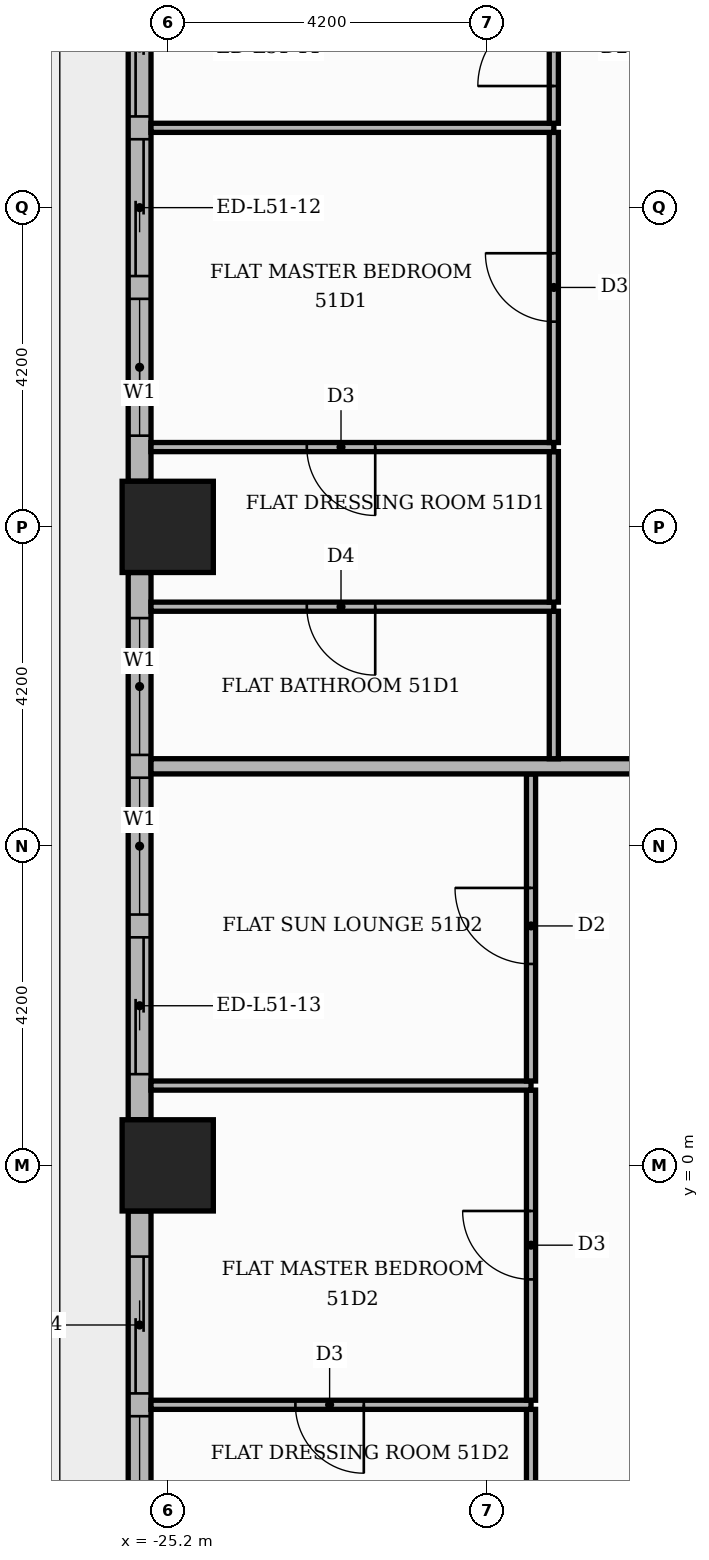
"""IFC4 building model, lengths in metres.
Left out: names, types, materials, properties, quantities, classifications, styles, units other than length and angle.
Written with IfcOpenShell. Run it as: python <this file> out.ifc"""

import sys

from ifc_helpers import new_model, si_unit, direction, frame, frame_2d, origin, origin_2d, place, context, subcontext, project, spatial, rectangle, extrude, element, fill, save


model = new_model("IFC4")
c1 = context("Model", 3, precision=1e-05, world=origin(), true_north=direction((0.0, 1.0)))
c2 = subcontext(c1, "Body", "Model", "MODEL_VIEW")
j1 = project(units=[si_unit("LENGTHUNIT", "METRE"), si_unit("PLANEANGLEUNIT", "RADIAN")], contexts=[c1])
p1 = place(None, origin())
s1 = spatial("IfcSite", under=j1, at=p1, CompositionType="ELEMENT")
p2 = place(p1, origin())
s2 = spatial("IfcBuilding", under=s1, at=p2, CompositionType="ELEMENT")
p3 = place(p2, frame((0.0, 0.0, 215.7)))
s3 = spatial("IfcBuildingStorey", under=s2, at=p3, CompositionType="ELEMENT", Elevation=215.7)
for number, where, z_axis, x_axis in (
    (1, (-25.2, 0.0, 0.0), (0.0, 0.0, 1.0), (1.0, 0.0, 0.0)),
    (2, (-25.2, 8.4, 0.0), (0.0, 0.0, 1.0), (1.0, 0.0, 0.0)),
):
    element("IfcColumn", number, at=place(p3, frame(where, z_axis=z_axis, x_axis=x_axis)), inside=s3, PredefinedType="COLUMN", context=c2, shape_type="SweptSolid", body=[
        extrude(rectangle(XDim=1.2, YDim=1.2, at=origin_2d()), origin(), (0.0, 0.0, 1.0), 3.9),
    ])
p4 = place(p3, frame((-25.57, 16.2, 0.0), z_axis=(0.0, 0.0, 1.0), x_axis=(0.0, -1.0, 0.0)))
e3 = element("IfcWall", 3, at=p4, inside=s3, PredefinedType="STANDARD", context=c2, shape_type="SweptSolid", body=[
    extrude(rectangle(XDim=7.2, YDim=0.3, at=frame_2d((3.6, 0.0))), origin(), (0.0, 0.0, 1.0), 3.48),
])
p5 = place(p4, frame((0.6, 0.0, 0.0)))
e4 = element("IfcOpeningElement", 4, at=p5, cuts=e3, PredefinedType="OPENING", context=c2, shape_type="SweptSolid", body=[
    extrude(rectangle(XDim=1.8, YDim=2.4, at=frame_2d((0.9, 1.2))), frame((0.0, 0.16, 0.0), z_axis=(0.0, -1.0, 0.0), x_axis=(1.0, 0.0, 0.0)), (0.0, 0.0, 1.0), 0.32),
])
p6 = place(p4, frame((2.7, 0.0, 0.0)))
e5 = element("IfcOpeningElement", 5, at=p6, cuts=e3, PredefinedType="OPENING", context=c2, shape_type="SweptSolid", body=[
    extrude(rectangle(XDim=1.8, YDim=2.4, at=frame_2d((0.9, 1.2))), frame((0.0, 0.16, 0.0), z_axis=(0.0, -1.0, 0.0), x_axis=(1.0, 0.0, 0.0)), (0.0, 0.0, 1.0), 0.32),
])
p7 = place(p4, frame((4.8, 0.0, 0.9)))
e6 = element("IfcOpeningElement", 6, at=p7, cuts=e3, PredefinedType="OPENING", context=c2, shape_type="SweptSolid", body=[
    extrude(rectangle(XDim=1.8, YDim=2.1, at=frame_2d((0.9, 1.05))), frame((0.0, 0.16, 0.0), z_axis=(0.0, -1.0, 0.0), x_axis=(1.0, 0.0, 0.0)), (0.0, 0.0, 1.0), 0.32),
])
p8 = place(p3, frame((-25.57, 7.8, 0.0), z_axis=(0.0, 0.0, 1.0), x_axis=(0.0, -1.0, 0.0)))
e7 = element("IfcWall", 7, at=p8, inside=s3, PredefinedType="STANDARD", context=c2, shape_type="SweptSolid", body=[
    extrude(rectangle(XDim=7.2, YDim=0.3, at=frame_2d((3.6, 0.0))), origin(), (0.0, 0.0, 1.0), 3.48),
])
p9 = place(p8, frame((0.6, 0.0, 0.9)))
e8 = element("IfcOpeningElement", 8, at=p9, cuts=e7, PredefinedType="OPENING", context=c2, shape_type="SweptSolid", body=[
    extrude(rectangle(XDim=1.8, YDim=2.1, at=frame_2d((0.9, 1.05))), frame((0.0, 0.16, 0.0), z_axis=(0.0, -1.0, 0.0), x_axis=(1.0, 0.0, 0.0)), (0.0, 0.0, 1.0), 0.32),
])
p10 = place(p8, frame((2.7, 0.0, 0.9)))
e9 = element("IfcOpeningElement", 9, at=p10, cuts=e7, PredefinedType="OPENING", context=c2, shape_type="SweptSolid", body=[
    extrude(rectangle(XDim=1.8, YDim=2.1, at=frame_2d((0.9, 1.05))), frame((0.0, 0.16, 0.0), z_axis=(0.0, -1.0, 0.0), x_axis=(1.0, 0.0, 0.0)), (0.0, 0.0, 1.0), 0.32),
])
p11 = place(p8, frame((4.8, 0.0, 0.0)))
e10 = element("IfcOpeningElement", 10, at=p11, cuts=e7, PredefinedType="OPENING", context=c2, shape_type="SweptSolid", body=[
    extrude(rectangle(XDim=1.8, YDim=2.4, at=frame_2d((0.9, 1.2))), frame((0.0, 0.16, 0.0), z_axis=(0.0, -1.0, 0.0), x_axis=(1.0, 0.0, 0.0)), (0.0, 0.0, 1.0), 0.32),
])
p12 = place(p3, frame((-25.57, -0.6, 0.0), z_axis=(0.0, 0.0, 1.0), x_axis=(0.0, -1.0, 0.0)))
e11 = element("IfcWall", 11, at=p12, inside=s3, PredefinedType="STANDARD", context=c2, shape_type="SweptSolid", body=[
    extrude(rectangle(XDim=7.2, YDim=0.3, at=frame_2d((3.6, 0.0))), origin(), (0.0, 0.0, 1.0), 3.48),
])
p13 = place(p12, frame((0.6, 0.0, 0.0)))
e12 = element("IfcOpeningElement", 12, at=p13, cuts=e11, PredefinedType="OPENING", context=c2, shape_type="SweptSolid", body=[
    extrude(rectangle(XDim=1.8, YDim=2.4, at=frame_2d((0.9, 1.2))), frame((0.0, 0.16, 0.0), z_axis=(0.0, -1.0, 0.0), x_axis=(1.0, 0.0, 0.0)), (0.0, 0.0, 1.0), 0.32),
])
p14 = place(p12, frame((2.7, 0.0, 0.9)))
e13 = element("IfcOpeningElement", 13, at=p14, cuts=e11, PredefinedType="OPENING", context=c2, shape_type="SweptSolid", body=[
    extrude(rectangle(XDim=1.8, YDim=2.1, at=frame_2d((0.9, 1.05))), frame((0.0, 0.16, 0.0), z_axis=(0.0, -1.0, 0.0), x_axis=(1.0, 0.0, 0.0)), (0.0, 0.0, 1.0), 0.32),
])
p15 = place(p12, frame((4.8, 0.0, 0.9)))
e14 = element("IfcOpeningElement", 14, at=p15, cuts=e11, PredefinedType="OPENING", context=c2, shape_type="SweptSolid", body=[
    extrude(rectangle(XDim=1.8, YDim=2.1, at=frame_2d((0.9, 1.05))), frame((0.0, 0.16, 0.0), z_axis=(0.0, -1.0, 0.0), x_axis=(1.0, 0.0, 0.0)), (0.0, 0.0, 1.0), 0.32),
])
p16 = place(p3, frame((-20.42, -5.19, 0.0), z_axis=(0.0, 0.0, 1.0), x_axis=(0.0, 1.0, 0.0)))
e15 = element("IfcWall", 15, at=p16, inside=s3, PredefinedType="PARTITIONING", context=c2, shape_type="SweptSolid", body=[
    extrude(rectangle(XDim=1.98, YDim=0.12, at=frame_2d((0.99, 0.0))), origin(), (0.0, 0.0, 1.0), 3.48),
])
p17 = place(p3, frame((-25.42, -3.15, 0.0), z_axis=(0.0, 0.0, 1.0), x_axis=(1.0, 0.0, 0.0)))
e16 = element("IfcWall", 16, at=p17, inside=s3, PredefinedType="PARTITIONING", context=c2, shape_type="SweptSolid", body=[
    extrude(rectangle(XDim=5.0, YDim=0.12, at=frame_2d((2.5, 0.0))), origin(), (0.0, 0.0, 1.0), 3.48),
])
p18 = place(p17, frame((1.9, 0.0, 0.0)))
e17 = element("IfcOpeningElement", 17, at=p18, cuts=e16, PredefinedType="OPENING", context=c2, shape_type="SweptSolid", body=[
    extrude(rectangle(XDim=0.9, YDim=2.1, at=frame_2d((0.45, 1.05))), frame((0.0, 0.07, 0.0), z_axis=(0.0, -1.0, 0.0), x_axis=(1.0, 0.0, 0.0)), (0.0, 0.0, 1.0), 0.14),
])
p19 = place(p3, frame((-20.42, -3.09, 0.0), z_axis=(0.0, 0.0, 1.0), x_axis=(0.0, 1.0, 0.0)))
e18 = element("IfcWall", 18, at=p19, inside=s3, PredefinedType="PARTITIONING", context=c2, shape_type="SweptSolid", body=[
    extrude(rectangle(XDim=4.08, YDim=0.12, at=frame_2d((2.04, 0.0))), origin(), (0.0, 0.0, 1.0), 3.48),
])
p20 = place(p19, frame((1.59, 0.0, 0.0)))
e19 = element("IfcOpeningElement", 19, at=p20, cuts=e18, PredefinedType="OPENING", context=c2, shape_type="SweptSolid", body=[
    extrude(rectangle(XDim=0.9, YDim=2.1, at=frame_2d((0.45, 1.05))), frame((0.0, 0.07, 0.0), z_axis=(0.0, -1.0, 0.0), x_axis=(1.0, 0.0, 0.0)), (0.0, 0.0, 1.0), 0.14),
])
p21 = place(p3, frame((-25.42, 1.05, 0.0), z_axis=(0.0, 0.0, 1.0), x_axis=(1.0, 0.0, 0.0)))
e20 = element("IfcWall", 20, at=p21, inside=s3, PredefinedType="PARTITIONING", context=c2, shape_type="SweptSolid", body=[
    extrude(rectangle(XDim=5.0, YDim=0.12, at=frame_2d((2.5, 0.0))), origin(), (0.0, 0.0, 1.0), 3.48),
])
p22 = place(p3, frame((-20.42, 1.11, 0.0), z_axis=(0.0, 0.0, 1.0), x_axis=(0.0, 1.0, 0.0)))
e21 = element("IfcWall", 21, at=p22, inside=s3, PredefinedType="PARTITIONING", context=c2, shape_type="SweptSolid", body=[
    extrude(rectangle(XDim=4.04, YDim=0.12, at=frame_2d((2.02, 0.0))), origin(), (0.0, 0.0, 1.0), 3.48),
])
p23 = place(p22, frame((1.54, 0.0, 0.0)))
e22 = element("IfcOpeningElement", 22, at=p23, cuts=e21, PredefinedType="OPENING", context=c2, shape_type="SweptSolid", body=[
    extrude(rectangle(XDim=1.0, YDim=2.1, at=frame_2d((0.5, 1.05))), frame((0.0, 0.07, 0.0), z_axis=(0.0, -1.0, 0.0), x_axis=(1.0, 0.0, 0.0)), (0.0, 0.0, 1.0), 0.14),
])
p24 = place(p3, frame((-25.42, 5.25, 0.0), z_axis=(0.0, 0.0, 1.0), x_axis=(1.0, 0.0, 0.0)))
e23 = element("IfcWall", 23, at=p24, inside=s3, PredefinedType="PARTITIONING", context=c2, shape_type="SweptSolid", body=[
    extrude(rectangle(XDim=11.77, YDim=0.2, at=frame_2d((5.885, 0.0))), origin(), (0.0, 0.0, 1.0), 3.48),
])
p25 = place(p3, frame((-20.12, 5.35, 0.0), z_axis=(0.0, 0.0, 1.0), x_axis=(0.0, 1.0, 0.0)))
e24 = element("IfcWall", 24, at=p25, inside=s3, PredefinedType="PARTITIONING", context=c2, shape_type="SweptSolid", body=[
    extrude(rectangle(XDim=1.94, YDim=0.12, at=frame_2d((0.97, 0.0))), origin(), (0.0, 0.0, 1.0), 3.48),
])
p26 = place(p3, frame((-25.42, 7.35, 0.0), z_axis=(0.0, 0.0, 1.0), x_axis=(1.0, 0.0, 0.0)))
e25 = element("IfcWall", 25, at=p26, inside=s3, PredefinedType="PARTITIONING", context=c2, shape_type="SweptSolid", body=[
    extrude(rectangle(XDim=5.3, YDim=0.12, at=frame_2d((2.65, 0.0))), origin(), (0.0, 0.0, 1.0), 3.48),
])
p27 = place(p26, frame((2.05, 0.0, 0.0)))
e26 = element("IfcOpeningElement", 26, at=p27, cuts=e25, PredefinedType="OPENING", context=c2, shape_type="SweptSolid", body=[
    extrude(rectangle(XDim=0.9, YDim=2.1, at=frame_2d((0.45, 1.05))), frame((0.0, 0.07, 0.0), z_axis=(0.0, -1.0, 0.0), x_axis=(1.0, 0.0, 0.0)), (0.0, 0.0, 1.0), 0.14),
])
p28 = place(p3, frame((-20.12, 7.41, 0.0), z_axis=(0.0, 0.0, 1.0), x_axis=(0.0, 1.0, 0.0)))
e27 = element("IfcWall", 27, at=p28, inside=s3, PredefinedType="PARTITIONING", context=c2, shape_type="SweptSolid", body=[
    extrude(rectangle(XDim=1.98, YDim=0.12, at=frame_2d((0.99, 0.0))), origin(), (0.0, 0.0, 1.0), 3.48),
])
p29 = place(p3, frame((-25.42, 9.45, 0.0), z_axis=(0.0, 0.0, 1.0), x_axis=(1.0, 0.0, 0.0)))
e28 = element("IfcWall", 28, at=p29, inside=s3, PredefinedType="PARTITIONING", context=c2, shape_type="SweptSolid", body=[
    extrude(rectangle(XDim=5.3, YDim=0.12, at=frame_2d((2.65, 0.0))), origin(), (0.0, 0.0, 1.0), 3.48),
])
p30 = place(p29, frame((2.05, 0.0, 0.0)))
e29 = element("IfcOpeningElement", 29, at=p30, cuts=e28, PredefinedType="OPENING", context=c2, shape_type="SweptSolid", body=[
    extrude(rectangle(XDim=0.9, YDim=2.1, at=frame_2d((0.45, 1.05))), frame((0.0, 0.07, 0.0), z_axis=(0.0, -1.0, 0.0), x_axis=(1.0, 0.0, 0.0)), (0.0, 0.0, 1.0), 0.14),
])
p31 = place(p3, frame((-20.12, 9.51, 0.0), z_axis=(0.0, 0.0, 1.0), x_axis=(0.0, 1.0, 0.0)))
e30 = element("IfcWall", 30, at=p31, inside=s3, PredefinedType="PARTITIONING", context=c2, shape_type="SweptSolid", body=[
    extrude(rectangle(XDim=4.08, YDim=0.12, at=frame_2d((2.04, 0.0))), origin(), (0.0, 0.0, 1.0), 3.48),
])
p32 = place(p31, frame((1.59, 0.0, 0.0)))
e31 = element("IfcOpeningElement", 31, at=p32, cuts=e30, PredefinedType="OPENING", context=c2, shape_type="SweptSolid", body=[
    extrude(rectangle(XDim=0.9, YDim=2.1, at=frame_2d((0.45, 1.05))), frame((0.0, 0.07, 0.0), z_axis=(0.0, -1.0, 0.0), x_axis=(1.0, 0.0, 0.0)), (0.0, 0.0, 1.0), 0.14),
])
p33 = place(p3, frame((-25.42, 13.65, 0.0), z_axis=(0.0, 0.0, 1.0), x_axis=(1.0, 0.0, 0.0)))
e32 = element("IfcWall", 32, at=p33, inside=s3, PredefinedType="PARTITIONING", context=c2, shape_type="SweptSolid", body=[
    extrude(rectangle(XDim=5.3, YDim=0.12, at=frame_2d((2.65, 0.0))), origin(), (0.0, 0.0, 1.0), 3.48),
])
p34 = place(p3, frame((-20.12, 13.71, 0.0), z_axis=(0.0, 0.0, 1.0), x_axis=(0.0, 1.0, 0.0)))
e33 = element("IfcWall", 33, at=p34, inside=s3, PredefinedType="PARTITIONING", context=c2, shape_type="SweptSolid", body=[
    extrude(rectangle(XDim=1.98, YDim=0.12, at=frame_2d((0.99, 0.0))), origin(), (0.0, 0.0, 1.0), 3.48),
])
p35 = place(p34, frame((0.49, 0.0, 0.0)))
e34 = element("IfcOpeningElement", 34, at=p35, cuts=e33, PredefinedType="OPENING", context=c2, shape_type="SweptSolid", body=[
    extrude(rectangle(XDim=1.0, YDim=2.1, at=frame_2d((0.5, 1.05))), frame((0.0, 0.07, 0.0), z_axis=(0.0, -1.0, 0.0), x_axis=(1.0, 0.0, 0.0)), (0.0, 0.0, 1.0), 0.14),
])
p36 = place(p5, origin())
e35 = element("IfcDoor", 35, at=p36, inside=s3, OperationType="SLIDING_TO_LEFT", PredefinedType="DOOR", context=c2, shape_type="SweptSolid", body=[
    extrude(rectangle(XDim=1.8, YDim=2.4, at=frame_2d((0.9, 1.2))), frame((0.0, 0.025, 0.0), z_axis=(0.0, -1.0, 0.0), x_axis=(1.0, 0.0, 0.0)), (0.0, 0.0, 1.0), 0.05),
])
fill(e4, e35)
p37 = place(p6, origin())
e36 = element("IfcDoor", 36, at=p37, inside=s3, OperationType="SLIDING_TO_RIGHT", PredefinedType="DOOR", context=c2, shape_type="SweptSolid", body=[
    extrude(rectangle(XDim=1.8, YDim=2.4, at=frame_2d((0.9, 1.2))), frame((0.0, 0.025, 0.0), z_axis=(0.0, -1.0, 0.0), x_axis=(1.0, 0.0, 0.0)), (0.0, 0.0, 1.0), 0.05),
])
fill(e5, e36)
p38 = place(p7, origin())
e37 = element("IfcWindow", 37, at=p38, inside=s3, PartitioningType="SINGLE_PANEL", PredefinedType="WINDOW", context=c2, shape_type="SweptSolid", body=[
    extrude(rectangle(XDim=1.8, YDim=2.1, at=frame_2d((0.9, 1.05))), frame((0.0, 0.03, 0.0), z_axis=(0.0, -1.0, 0.0), x_axis=(1.0, 0.0, 0.0)), (0.0, 0.0, 1.0), 0.06),
])
fill(e6, e37)
p39 = place(p9, origin())
e38 = element("IfcWindow", 38, at=p39, inside=s3, PartitioningType="SINGLE_PANEL", PredefinedType="WINDOW", context=c2, shape_type="SweptSolid", body=[
    extrude(rectangle(XDim=1.8, YDim=2.1, at=frame_2d((0.9, 1.05))), frame((0.0, 0.03, 0.0), z_axis=(0.0, -1.0, 0.0), x_axis=(1.0, 0.0, 0.0)), (0.0, 0.0, 1.0), 0.06),
])
fill(e8, e38)
p40 = place(p10, origin())
e39 = element("IfcWindow", 39, at=p40, inside=s3, PartitioningType="SINGLE_PANEL", PredefinedType="WINDOW", context=c2, shape_type="SweptSolid", body=[
    extrude(rectangle(XDim=1.8, YDim=2.1, at=frame_2d((0.9, 1.05))), frame((0.0, 0.03, 0.0), z_axis=(0.0, -1.0, 0.0), x_axis=(1.0, 0.0, 0.0)), (0.0, 0.0, 1.0), 0.06),
])
fill(e9, e39)
p41 = place(p11, origin())
e40 = element("IfcDoor", 40, at=p41, inside=s3, OperationType="SLIDING_TO_RIGHT", PredefinedType="DOOR", context=c2, shape_type="SweptSolid", body=[
    extrude(rectangle(XDim=1.8, YDim=2.4, at=frame_2d((0.9, 1.2))), frame((0.0, 0.025, 0.0), z_axis=(0.0, -1.0, 0.0), x_axis=(1.0, 0.0, 0.0)), (0.0, 0.0, 1.0), 0.05),
])
fill(e10, e40)
p42 = place(p13, origin())
e41 = element("IfcDoor", 41, at=p42, inside=s3, OperationType="SLIDING_TO_LEFT", PredefinedType="DOOR", context=c2, shape_type="SweptSolid", body=[
    extrude(rectangle(XDim=1.8, YDim=2.4, at=frame_2d((0.9, 1.2))), frame((0.0, 0.025, 0.0), z_axis=(0.0, -1.0, 0.0), x_axis=(1.0, 0.0, 0.0)), (0.0, 0.0, 1.0), 0.05),
])
fill(e12, e41)
p43 = place(p14, origin())
e42 = element("IfcWindow", 42, at=p43, inside=s3, PartitioningType="SINGLE_PANEL", PredefinedType="WINDOW", context=c2, shape_type="SweptSolid", body=[
    extrude(rectangle(XDim=1.8, YDim=2.1, at=frame_2d((0.9, 1.05))), frame((0.0, 0.03, 0.0), z_axis=(0.0, -1.0, 0.0), x_axis=(1.0, 0.0, 0.0)), (0.0, 0.0, 1.0), 0.06),
])
fill(e13, e42)
p44 = place(p35, origin())
e43 = element("IfcDoor", 43, at=p44, inside=s3, OperationType="SINGLE_SWING_LEFT", PredefinedType="DOOR", context=c2, shape_type="SweptSolid", body=[
    extrude(rectangle(XDim=1.0, YDim=2.1, at=frame_2d((0.5, 1.05))), frame((0.0, 0.025, 0.0), z_axis=(0.0, -1.0, 0.0), x_axis=(1.0, 0.0, 0.0)), (0.0, 0.0, 1.0), 0.05),
])
fill(e34, e43)
p45 = place(p32, origin())
e44 = element("IfcDoor", 44, at=p45, inside=s3, OperationType="SINGLE_SWING_RIGHT", PredefinedType="DOOR", context=c2, shape_type="SweptSolid", body=[
    extrude(rectangle(XDim=0.9, YDim=2.1, at=frame_2d((0.45, 1.05))), frame((0.0, 0.025, 0.0), z_axis=(0.0, -1.0, 0.0), x_axis=(1.0, 0.0, 0.0)), (0.0, 0.0, 1.0), 0.05),
])
fill(e31, e44)
p46 = place(p30, frame((0.9, 0.0, 0.0), z_axis=(0.0, 0.0, 1.0), x_axis=(-1.0, 0.0, 0.0)))
e45 = element("IfcDoor", 45, at=p46, inside=s3, OperationType="SINGLE_SWING_RIGHT", PredefinedType="DOOR", context=c2, shape_type="SweptSolid", body=[
    extrude(rectangle(XDim=0.9, YDim=2.1, at=frame_2d((0.45, 1.05))), frame((0.0, 0.025, 0.0), z_axis=(0.0, -1.0, 0.0), x_axis=(1.0, 0.0, 0.0)), (0.0, 0.0, 1.0), 0.05),
])
fill(e29, e45)
p47 = place(p27, frame((0.9, 0.0, 0.0), z_axis=(0.0, 0.0, 1.0), x_axis=(-1.0, 0.0, 0.0)))
e46 = element("IfcDoor", 46, at=p47, inside=s3, OperationType="SINGLE_SWING_RIGHT", PredefinedType="DOOR", context=c2, shape_type="SweptSolid", body=[
    extrude(rectangle(XDim=0.9, YDim=2.1, at=frame_2d((0.45, 1.05))), frame((0.0, 0.025, 0.0), z_axis=(0.0, -1.0, 0.0), x_axis=(1.0, 0.0, 0.0)), (0.0, 0.0, 1.0), 0.05),
])
fill(e26, e46)
p48 = place(p23, origin())
e47 = element("IfcDoor", 47, at=p48, inside=s3, OperationType="SINGLE_SWING_RIGHT", PredefinedType="DOOR", context=c2, shape_type="SweptSolid", body=[
    extrude(rectangle(XDim=1.0, YDim=2.1, at=frame_2d((0.5, 1.05))), frame((0.0, 0.025, 0.0), z_axis=(0.0, -1.0, 0.0), x_axis=(1.0, 0.0, 0.0)), (0.0, 0.0, 1.0), 0.05),
])
fill(e22, e47)
p49 = place(p20, origin())
e48 = element("IfcDoor", 48, at=p49, inside=s3, OperationType="SINGLE_SWING_RIGHT", PredefinedType="DOOR", context=c2, shape_type="SweptSolid", body=[
    extrude(rectangle(XDim=0.9, YDim=2.1, at=frame_2d((0.45, 1.05))), frame((0.0, 0.025, 0.0), z_axis=(0.0, -1.0, 0.0), x_axis=(1.0, 0.0, 0.0)), (0.0, 0.0, 1.0), 0.05),
])
fill(e19, e48)
p50 = place(p18, frame((0.9, 0.0, 0.0), z_axis=(0.0, 0.0, 1.0), x_axis=(-1.0, 0.0, 0.0)))
e49 = element("IfcDoor", 49, at=p50, inside=s3, OperationType="SINGLE_SWING_RIGHT", PredefinedType="DOOR", context=c2, shape_type="SweptSolid", body=[
    extrude(rectangle(XDim=0.9, YDim=2.1, at=frame_2d((0.45, 1.05))), frame((0.0, 0.025, 0.0), z_axis=(0.0, -1.0, 0.0), x_axis=(1.0, 0.0, 0.0)), (0.0, 0.0, 1.0), 0.05),
])
fill(e17, e49)
save(model, sys.argv[1])
